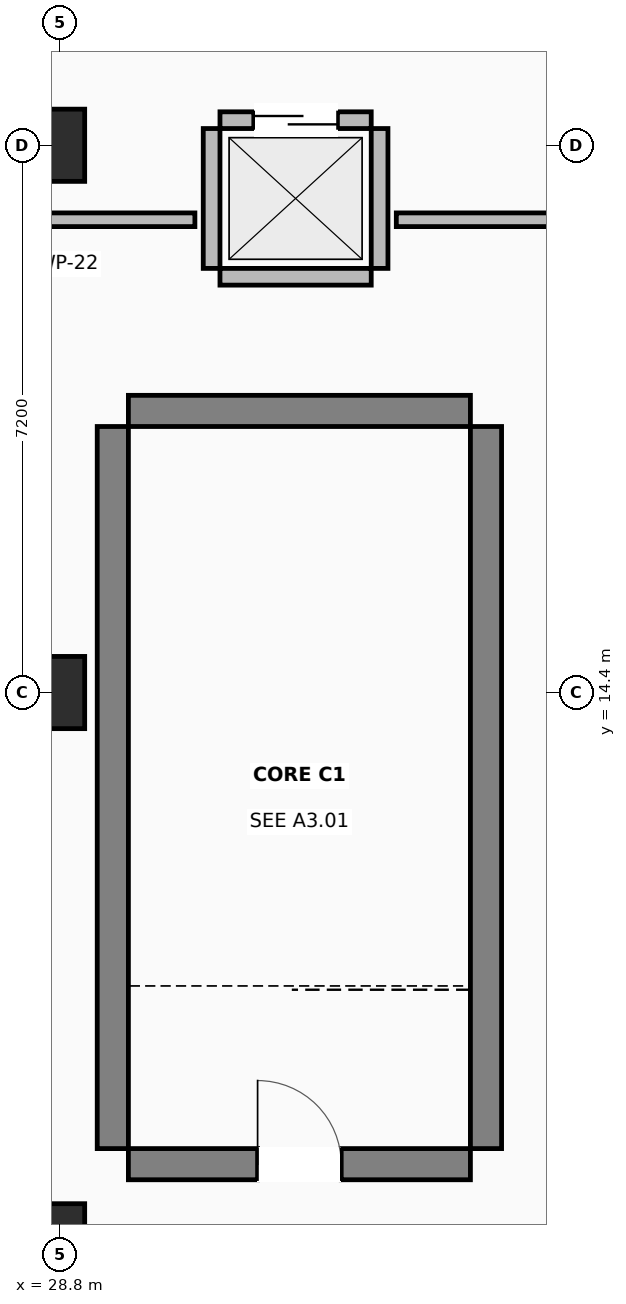
"""IFC4 building model, lengths in metres.
Left out: names, types, materials, properties, quantities, classifications, styles, units other than length and angle.
Written with IfcOpenShell. Run it as: python <this file> out.ifc"""

import sys

from ifc_helpers import new_model, si_unit, direction, frame, frame_2d, origin, origin_2d, place, context, subcontext, project, spatial, rectangle, extrude, element, fill, save


model = new_model("IFC4")
c1 = context("Model", 3, precision=1e-05, world=origin(), true_north=direction((0.0, 1.0)))
c2 = subcontext(c1, "Body", "Model", "MODEL_VIEW")
j1 = project(units=[si_unit("LENGTHUNIT", "METRE"), si_unit("PLANEANGLEUNIT", "RADIAN")], contexts=[c1])
p1 = place(None, origin())
s1 = spatial("IfcSite", under=j1, at=p1, CompositionType="ELEMENT")
p2 = place(p1, origin())
s2 = spatial("IfcBuilding", under=s1, at=p2, CompositionType="ELEMENT")
p3 = place(p2, frame((0.0, 0.0, 4.5)))
s3 = spatial("IfcBuildingStorey", under=s2, at=p3, CompositionType="ELEMENT", Elevation=4.5)
for number, where, z_axis, x_axis in (
    (1, (28.8, 7.2, 0.0), (0.0, 0.0, 1.0), (1.0, 0.0, 0.0)),
    (2, (28.8, 14.4, 0.0), (0.0, 0.0, 1.0), (1.0, 0.0, 0.0)),
    (3, (28.8, 21.6, 0.0), (0.0, 0.0, 1.0), (1.0, 0.0, 0.0)),
):
    element("IfcColumn", number, at=place(p3, frame(where, z_axis=z_axis, x_axis=x_axis)), inside=s3, PredefinedType="COLUMN", context=c2, shape_type="SweptSolid", body=[
        extrude(rectangle(XDim=0.65, YDim=0.95, at=origin_2d()), origin(), (0.0, 0.0, 1.0), 4.5),
    ])
p4 = place(p3, frame((29.7, 8.195, 0.0), z_axis=(0.0, 0.0, 1.0), x_axis=(1.0, 0.0, 0.0)))
e4 = element("IfcWall", 4, at=p4, inside=s3, PredefinedType="SHEAR", context=c2, shape_type="SweptSolid", body=[
    extrude(rectangle(XDim=4.5, YDim=0.41, at=frame_2d((2.25, 0.0))), origin(), (0.0, 0.0, 1.0), 4.22),
])
p5 = place(p4, frame((1.7, 0.0, 0.0)))
e5 = element("IfcOpeningElement", 5, at=p5, cuts=e4, PredefinedType="OPENING", context=c2, shape_type="SweptSolid", body=[
    extrude(rectangle(XDim=1.1, YDim=2.15, at=frame_2d((0.55, 1.075))), frame((0.0, 0.215, 0.0), z_axis=(0.0, -1.0, 0.0), x_axis=(1.0, 0.0, 0.0)), (0.0, 0.0, 1.0), 0.43),
])
p6 = place(p3, frame((29.7, 18.105, 0.0), z_axis=(0.0, 0.0, 1.0), x_axis=(1.0, 0.0, 0.0)))
e6 = element("IfcWall", 6, at=p6, inside=s3, PredefinedType="SHEAR", context=c2, shape_type="SweptSolid", body=[
    extrude(rectangle(XDim=4.5, YDim=0.41, at=frame_2d((2.25, 0.0))), origin(), (0.0, 0.0, 1.0), 4.22),
])
for number, where, z_axis, x_axis in (
    (7, (29.495, 8.4, 0.0), (0.0, 0.0, 1.0), (0.0, 1.0, 0.0)),
    (8, (34.405, 8.4, 0.0), (0.0, 0.0, 1.0), (0.0, 1.0, 0.0)),
):
    element("IfcWall", number, at=place(p3, frame(where, z_axis=z_axis, x_axis=x_axis)), inside=s3, PredefinedType="SHEAR", context=c2, shape_type="SweptSolid", body=[
        extrude(rectangle(XDim=9.5, YDim=0.41, at=frame_2d((4.75, 0.0))), origin(), (0.0, 0.0, 1.0), 4.22),
    ])
p7 = place(p3, frame((30.905, 19.87, 0.0), z_axis=(0.0, 0.0, 1.0), x_axis=(1.0, 0.0, 0.0)))
e9 = element("IfcWall", 9, at=p7, inside=s3, PredefinedType="STANDARD", context=c2, shape_type="SweptSolid", body=[
    extrude(rectangle(XDim=1.99, YDim=0.22, at=frame_2d((0.995, 0.0))), origin(), (0.0, 0.0, 1.0), 3.26),
])
p8 = place(p3, frame((30.905, 21.93, 0.0), z_axis=(0.0, 0.0, 1.0), x_axis=(1.0, 0.0, 0.0)))
e10 = element("IfcWall", 10, at=p8, inside=s3, PredefinedType="STANDARD", context=c2, shape_type="SweptSolid", body=[
    extrude(rectangle(XDim=1.99, YDim=0.22, at=frame_2d((0.995, 0.0))), origin(), (0.0, 0.0, 1.0), 3.26),
])
p9 = place(p8, frame((0.445, 0.0, 0.0)))
e11 = element("IfcOpeningElement", 11, at=p9, cuts=e10, PredefinedType="OPENING", context=c2, shape_type="SweptSolid", body=[
    extrude(rectangle(XDim=1.1, YDim=2.15, at=frame_2d((0.55, 1.075))), frame((0.0, 0.12, 0.0), z_axis=(0.0, -1.0, 0.0), x_axis=(1.0, 0.0, 0.0)), (0.0, 0.0, 1.0), 0.24),
])
for number, where, z_axis, x_axis in (
    (12, (30.795, 19.98, 0.0), (0.0, 0.0, 1.0), (0.0, 1.0, 0.0)),
    (13, (33.005, 19.98, 0.0), (0.0, 0.0, 1.0), (0.0, 1.0, 0.0)),
):
    element("IfcWall", number, at=place(p3, frame(where, z_axis=z_axis, x_axis=x_axis)), inside=s3, PredefinedType="STANDARD", context=c2, shape_type="SweptSolid", body=[
        extrude(rectangle(XDim=1.84, YDim=0.22, at=frame_2d((0.92, 0.0))), origin(), (0.0, 0.0, 1.0), 3.26),
    ])
p10 = place(p3, frame((30.575, 20.62, 0.0), z_axis=(0.0, 0.0, 1.0), x_axis=(-1.0, 0.0, 0.0)))
e14 = element("IfcWall", 14, at=p10, inside=s3, PredefinedType="PARTITIONING", context=c2, shape_type="SweptSolid", body=[
    extrude(rectangle(XDim=3.355, YDim=0.18, at=frame_2d((1.677, 0.0))), origin(), (0.0, 0.0, 1.0), 3.26),
])
p11 = place(p3, frame((35.808, 20.62, 0.0), z_axis=(0.0, 0.0, 1.0), x_axis=(-1.0, 0.0, 0.0)))
e15 = element("IfcWall", 15, at=p11, inside=s3, PredefinedType="PARTITIONING", context=c2, shape_type="SweptSolid", body=[
    extrude(rectangle(XDim=2.583, YDim=0.18, at=frame_2d((1.292, 0.0))), origin(), (0.0, 0.0, 1.0), 3.26),
])
p12 = place(p5, origin())
e16 = element("IfcDoor", 16, at=p12, inside=s3, OperationType="SINGLE_SWING_LEFT", PredefinedType="DOOR", context=c2, shape_type="SweptSolid", body=[
    extrude(rectangle(XDim=1.1, YDim=2.15, at=frame_2d((0.55, 1.075))), frame((0.0, 0.025, 0.0), z_axis=(0.0, -1.0, 0.0), x_axis=(1.0, 0.0, 0.0)), (0.0, 0.0, 1.0), 0.05),
])
fill(e5, e16)
p13 = place(p9, origin())
e17 = element("IfcDoor", 17, at=p13, inside=s3, OperationType="SLIDING_TO_LEFT", PredefinedType="DOOR", context=c2, shape_type="SweptSolid", body=[
    extrude(rectangle(XDim=1.1, YDim=2.15, at=frame_2d((0.55, 1.075))), frame((0.0, 0.025, 0.0), z_axis=(0.0, -1.0, 0.0), x_axis=(1.0, 0.0, 0.0)), (0.0, 0.0, 1.0), 0.05),
])
fill(e11, e17)
save(model, sys.argv[1])
